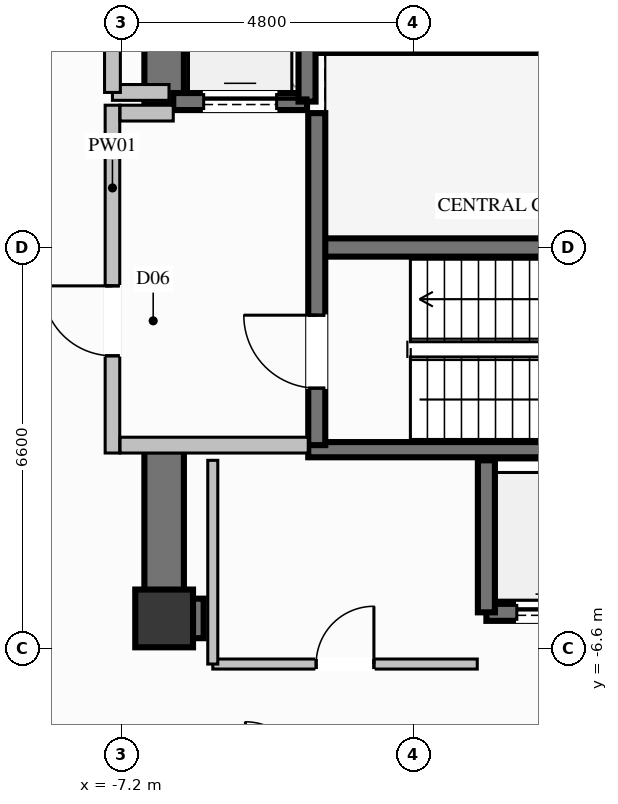
"""IFC4 building model, lengths in metres.
Left out: names, types, materials, properties, quantities, classifications, styles, units other than length and angle.
Written with IfcOpenShell. Run it as: python <this file> out.ifc"""

import sys

from ifc_helpers import new_model, si_unit, direction, frame, frame_2d, origin, origin_2d, place, context, subcontext, project, spatial, rectangle, extrude, element, fill, save


model = new_model("IFC4")
c1 = context("Model", 3, precision=1e-05, world=origin(), true_north=direction((0.0, 1.0)))
c2 = subcontext(c1, "Body", "Model", "MODEL_VIEW")
j1 = project(units=[si_unit("LENGTHUNIT", "METRE"), si_unit("PLANEANGLEUNIT", "RADIAN")], contexts=[c1])
p1 = place(None, origin())
s1 = spatial("IfcSite", under=j1, at=p1, CompositionType="ELEMENT")
p2 = place(p1, origin())
s2 = spatial("IfcBuilding", under=s1, at=p2, CompositionType="ELEMENT")
p3 = place(p2, frame((0.0, 0.0, 145.8)))
s3 = spatial("IfcBuildingStorey", under=s2, at=p3, CompositionType="ELEMENT", Elevation=145.8)
p4 = place(p3, frame((-6.5, -6.1, 0.0), z_axis=(0.0, 0.0, 1.0), x_axis=(1.0, 0.0, 0.0)))
e1 = element("IfcColumn", 1, at=p4, inside=s3, PredefinedType="COLUMN", context=c2, shape_type="SweptSolid", body=[
    extrude(rectangle(XDim=0.95, YDim=0.95, at=origin_2d()), origin(), (0.0, 0.0, 1.0), 3.6),
])
p5 = place(p3, frame((-3.99, 0.0, 0.0), z_axis=(0.0, 0.0, 1.0), x_axis=(1.0, 0.0, 0.0)))
e2 = element("IfcWall", 2, at=p5, inside=s3, PredefinedType="SHEAR", context=c2, shape_type="SweptSolid", body=[
    extrude(rectangle(XDim=7.98, YDim=0.3, at=frame_2d((3.99, 0.0))), origin(), (0.0, 0.0, 1.0), 3.6),
])
for number, where, z_axis, x_axis in (
    (3, (-4.13, -3.325, 0.0), (0.0, 0.0, 1.0), (1.0, 0.0, 0.0)),
    (4, (-4.13, 3.325, 0.0), (0.0, 0.0, 1.0), (1.0, 0.0, 0.0)),
):
    element("IfcWall", number, at=place(p3, frame(where, z_axis=z_axis, x_axis=x_axis)), inside=s3, PredefinedType="SOLIDWALL", context=c2, shape_type="SweptSolid", body=[
        extrude(rectangle(XDim=8.26, YDim=0.25, at=frame_2d((4.13, 0.0))), origin(), (0.0, 0.0, 1.0), 3.6),
    ])
p6 = place(p3, frame((-6.175, -6.1, 0.0), z_axis=(0.0, 0.0, 1.0), x_axis=(1.0, 0.0, 0.0)))
e5 = element("IfcWall", 5, at=p6, inside=s3, PredefinedType="SHEAR", context=c2, shape_type="SweptSolid", body=[
    extrude(rectangle(XDim=0.325, YDim=0.65, at=frame_2d((0.163, 0.0))), origin(), (0.0, 0.0, 1.0), 3.6),
])
p7 = place(p3, frame((-6.5, 2.35, 0.0), z_axis=(0.0, 0.0, 1.0), x_axis=(0.0, 1.0, 0.0)))
e6 = element("IfcWall", 6, at=p7, inside=s3, PredefinedType="SHEAR", context=c2, shape_type="SweptSolid", body=[
    extrude(rectangle(XDim=4.075, YDim=0.65, at=frame_2d((2.038, 0.0))), origin(), (0.0, 0.0, 1.0), 3.6),
])
p8 = place(p3, frame((-6.5, -6.425, 0.0), z_axis=(0.0, 0.0, 1.0), x_axis=(0.0, 1.0, 0.0)))
e7 = element("IfcWall", 7, at=p8, inside=s3, PredefinedType="SHEAR", context=c2, shape_type="SweptSolid", body=[
    extrude(rectangle(XDim=3.075, YDim=0.65, at=frame_2d((1.538, 0.0))), origin(), (0.0, 0.0, 1.0), 3.6),
])
p9 = place(p3, frame((-1.2, -6.0, 0.0), z_axis=(0.0, 0.0, 1.0), x_axis=(1.0, 0.0, 0.0)))
e8 = element("IfcWall", 8, at=p9, inside=s3, PredefinedType="SOLIDWALL", context=c2, shape_type="SweptSolid", body=[
    extrude(rectangle(XDim=2.1, YDim=0.28, at=frame_2d((1.05, 0.0))), origin(), (0.0, 0.0, 1.0), 3.35),
])
p10 = place(p9, frame((0.5, 0.0, 0.0)))
e9 = element("IfcOpeningElement", 9, at=p10, cuts=e8, PredefinedType="OPENING", context=c2, shape_type="SweptSolid", body=[
    extrude(rectangle(XDim=1.1, YDim=2.2, at=frame_2d((0.55, 1.1))), frame((0.0, 0.15, 0.0), z_axis=(0.0, -1.0, 0.0), x_axis=(1.0, 0.0, 0.0)), (0.0, 0.0, 1.0), 0.3),
])
p11 = place(p3, frame((-1.2, -3.5, 0.0), z_axis=(0.0, 0.0, 1.0), x_axis=(0.0, -1.0, 0.0)))
e10 = element("IfcWall", 10, at=p11, inside=s3, PredefinedType="SOLIDWALL", context=c2, shape_type="SweptSolid", body=[
    extrude(rectangle(XDim=2.5, YDim=0.28, at=frame_2d((1.25, 0.0))), origin(), (0.0, 0.0, 1.0), 3.35),
])
p12 = place(p3, frame((-6.35, 2.4, 0.0), z_axis=(0.0, 0.0, 1.0), x_axis=(1.0, 0.0, 0.0)))
e11 = element("IfcWall", 11, at=p12, inside=s3, PredefinedType="SOLIDWALL", context=c2, shape_type="SweptSolid", body=[
    extrude(rectangle(XDim=2.2, YDim=0.28, at=frame_2d((1.1, 0.0))), origin(), (0.0, 0.0, 1.0), 3.35),
])
p13 = place(p12, frame((0.5, 0.0, 0.0)))
e12 = element("IfcOpeningElement", 12, at=p13, cuts=e11, PredefinedType="OPENING", context=c2, shape_type="SweptSolid", body=[
    extrude(rectangle(XDim=1.2, YDim=2.2, at=frame_2d((0.6, 1.1))), frame((0.0, 0.15, 0.0), z_axis=(0.0, -1.0, 0.0), x_axis=(1.0, 0.0, 0.0)), (0.0, 0.0, 1.0), 0.3),
])
p14 = place(p3, frame((-4.15, 2.4, 0.0), z_axis=(0.0, 0.0, 1.0), x_axis=(0.0, 1.0, 0.0)))
e13 = element("IfcWall", 13, at=p14, inside=s3, PredefinedType="SOLIDWALL", context=c2, shape_type="SweptSolid", body=[
    extrude(rectangle(XDim=2.7, YDim=0.28, at=frame_2d((1.35, 0.0))), origin(), (0.0, 0.0, 1.0), 3.35),
])
p15 = place(p3, frame((-3.99, -3.25, 0.0), z_axis=(0.0, 0.0, 1.0), x_axis=(0.0, 1.0, 0.0)))
e14 = element("IfcWall", 14, at=p15, inside=s3, PredefinedType="SOLIDWALL", context=c2, shape_type="SweptSolid", body=[
    extrude(rectangle(XDim=5.46, YDim=0.28, at=frame_2d((2.73, 0.0))), origin(), (0.0, 0.0, 1.0), 3.35),
])
p16 = place(p15, frame((0.937, 0.0, 0.0)))
e15 = element("IfcOpeningElement", 15, at=p16, cuts=e14, PredefinedType="OPENING", context=c2, shape_type="SweptSolid", body=[
    extrude(rectangle(XDim=1.2, YDim=2.2, at=frame_2d((0.6, 1.1))), frame((0.0, 0.15, 0.0), z_axis=(0.0, -1.0, 0.0), x_axis=(1.0, 0.0, 0.0)), (0.0, 0.0, 1.0), 0.3),
])
p17 = place(p3, frame((-7.35, -3.38, 0.0), z_axis=(0.0, 0.0, 1.0), x_axis=(0.0, 1.0, 0.0)))
e16 = element("IfcWall", 16, at=p17, inside=s3, PredefinedType="PARTITIONING", context=c2, shape_type="SweptSolid", body=[
    extrude(rectangle(XDim=5.72, YDim=0.24, at=frame_2d((2.86, 0.0))), origin(), (0.0, 0.0, 1.0), 2.435),
])
p18 = place(p17, frame((1.599, 0.0, 0.0)))
e17 = element("IfcOpeningElement", 17, at=p18, cuts=e16, PredefinedType="OPENING", context=c2, shape_type="SweptSolid", body=[
    extrude(rectangle(XDim=1.15, YDim=2.2, at=frame_2d((0.575, 1.1))), frame((0.0, 0.13, 0.0), z_axis=(0.0, -1.0, 0.0), x_axis=(1.0, 0.0, 0.0)), (0.0, 0.0, 1.0), 0.26),
])
p19 = place(p3, frame((-7.225, -3.25, 0.0), z_axis=(0.0, 0.0, 1.0), x_axis=(1.0, 0.0, 0.0)))
e18 = element("IfcWall", 18, at=p19, inside=s3, PredefinedType="PARTITIONING", context=c2, shape_type="SweptSolid", body=[
    extrude(rectangle(XDim=3.095, YDim=0.26, at=frame_2d((1.548, 0.0))), origin(), (0.0, 0.0, 1.0), 3.35),
])
p20 = place(p3, frame((-7.225, 2.21, 0.0), z_axis=(0.0, 0.0, 1.0), x_axis=(1.0, 0.0, 0.0)))
e19 = element("IfcWall", 19, at=p20, inside=s3, PredefinedType="PARTITIONING", context=c2, shape_type="SweptSolid", body=[
    extrude(rectangle(XDim=0.875, YDim=0.26, at=frame_2d((0.438, 0.0))), origin(), (0.0, 0.0, 1.0), 3.35),
])
p21 = place(p3, frame((-7.35, 2.55, 0.0), z_axis=(0.0, 0.0, 1.0), x_axis=(1.0, 0.0, 0.0)))
e20 = element("IfcWall", 20, at=p21, inside=s3, PredefinedType="PARTITIONING", context=c2, shape_type="SweptSolid", body=[
    extrude(rectangle(XDim=0.93, YDim=0.26, at=frame_2d((0.465, 0.0))), origin(), (0.0, 0.0, 1.0), 3.35),
])
p22 = place(p3, frame((-7.35, 2.55, 0.0), z_axis=(0.0, 0.0, 1.0), x_axis=(0.0, 1.0, 0.0)))
e21 = element("IfcWall", 21, at=p22, inside=s3, PredefinedType="PARTITIONING", context=c2, shape_type="SweptSolid", body=[
    extrude(rectangle(XDim=2.4, YDim=0.26, at=frame_2d((1.2, 0.0))), origin(), (0.0, 0.0, 1.0), 2.435),
])
p23 = place(p22, frame((0.775, 0.0, 0.0)))
e22 = element("IfcOpeningElement", 22, at=p23, cuts=e21, PredefinedType="OPENING", context=c2, shape_type="SweptSolid", body=[
    extrude(rectangle(XDim=0.85, YDim=2.05, at=frame_2d((0.425, 1.025))), frame((0.0, 0.14, 0.0), z_axis=(0.0, -1.0, 0.0), x_axis=(1.0, 0.0, 0.0)), (0.0, 0.0, 1.0), 0.28),
])
p24 = place(p3, frame((-5.7, -6.85, 0.0), z_axis=(0.0, 0.0, 1.0), x_axis=(1.0, 0.0, 0.0)))
e23 = element("IfcWall", 23, at=p24, inside=s3, PredefinedType="PARTITIONING", context=c2, shape_type="SweptSolid", body=[
    extrude(rectangle(XDim=4.35, YDim=0.165, at=frame_2d((2.175, 0.0))), origin(), (0.0, 0.0, 1.0), 2.435),
])
p25 = place(p24, frame((1.7, 0.0, 0.0)))
e24 = element("IfcOpeningElement", 24, at=p25, cuts=e23, PredefinedType="OPENING", context=c2, shape_type="SweptSolid", body=[
    extrude(rectangle(XDim=0.95, YDim=2.1, at=frame_2d((0.475, 1.05))), frame((0.0, 0.093, 0.0), z_axis=(0.0, -1.0, 0.0), x_axis=(1.0, 0.0, 0.0)), (0.0, 0.0, 1.0), 0.185),
])
p26 = place(p3, frame((-5.7, -3.5, 0.0), z_axis=(0.0, 0.0, 1.0), x_axis=(0.0, -1.0, 0.0)))
e25 = element("IfcWall", 25, at=p26, inside=s3, PredefinedType="PARTITIONING", context=c2, shape_type="SweptSolid", body=[
    extrude(rectangle(XDim=3.35, YDim=0.165, at=frame_2d((1.675, 0.0))), origin(), (0.0, 0.0, 1.0), 2.435),
])
p27 = place(p10, origin())
e26 = element("IfcDoor", 26, at=p27, inside=s3, OperationType="SLIDING_TO_LEFT", PredefinedType="DOOR", context=c2, shape_type="SweptSolid", body=[
    extrude(rectangle(XDim=1.1, YDim=2.2, at=frame_2d((0.55, 1.1))), frame((0.0, 0.025, 0.0), z_axis=(0.0, -1.0, 0.0), x_axis=(1.0, 0.0, 0.0)), (0.0, 0.0, 1.0), 0.05),
])
fill(e9, e26)
p28 = place(p13, origin())
e27 = element("IfcDoor", 27, at=p28, inside=s3, OperationType="SLIDING_TO_LEFT", PredefinedType="DOOR", context=c2, shape_type="SweptSolid", body=[
    extrude(rectangle(XDim=1.2, YDim=2.2, at=frame_2d((0.6, 1.1))), frame((0.0, 0.025, 0.0), z_axis=(0.0, -1.0, 0.0), x_axis=(1.0, 0.0, 0.0)), (0.0, 0.0, 1.0), 0.05),
])
fill(e12, e27)
p29 = place(p16, origin())
e28 = element("IfcDoor", 28, at=p29, inside=s3, OperationType="SINGLE_SWING_RIGHT", PredefinedType="DOOR", context=c2, shape_type="SweptSolid", body=[
    extrude(rectangle(XDim=1.2, YDim=2.2, at=frame_2d((0.6, 1.1))), frame((0.0, 0.025, 0.0), z_axis=(0.0, -1.0, 0.0), x_axis=(1.0, 0.0, 0.0)), (0.0, 0.0, 1.0), 0.05),
])
fill(e15, e28)
p30 = place(p18, origin())
e29 = element("IfcDoor", 29, at=p30, inside=s3, OperationType="SINGLE_SWING_RIGHT", PredefinedType="DOOR", context=c2, shape_type="SweptSolid", body=[
    extrude(rectangle(XDim=1.15, YDim=2.2, at=frame_2d((0.575, 1.1))), frame((0.0, 0.025, 0.0), z_axis=(0.0, -1.0, 0.0), x_axis=(1.0, 0.0, 0.0)), (0.0, 0.0, 1.0), 0.05),
])
fill(e17, e29)
p31 = place(p25, origin())
e30 = element("IfcDoor", 30, at=p31, inside=s3, OperationType="SINGLE_SWING_RIGHT", PredefinedType="DOOR", context=c2, shape_type="SweptSolid", body=[
    extrude(rectangle(XDim=0.95, YDim=2.1, at=frame_2d((0.475, 1.05))), frame((0.0, 0.025, 0.0), z_axis=(0.0, -1.0, 0.0), x_axis=(1.0, 0.0, 0.0)), (0.0, 0.0, 1.0), 0.05),
])
fill(e24, e30)
save(model, sys.argv[1])
